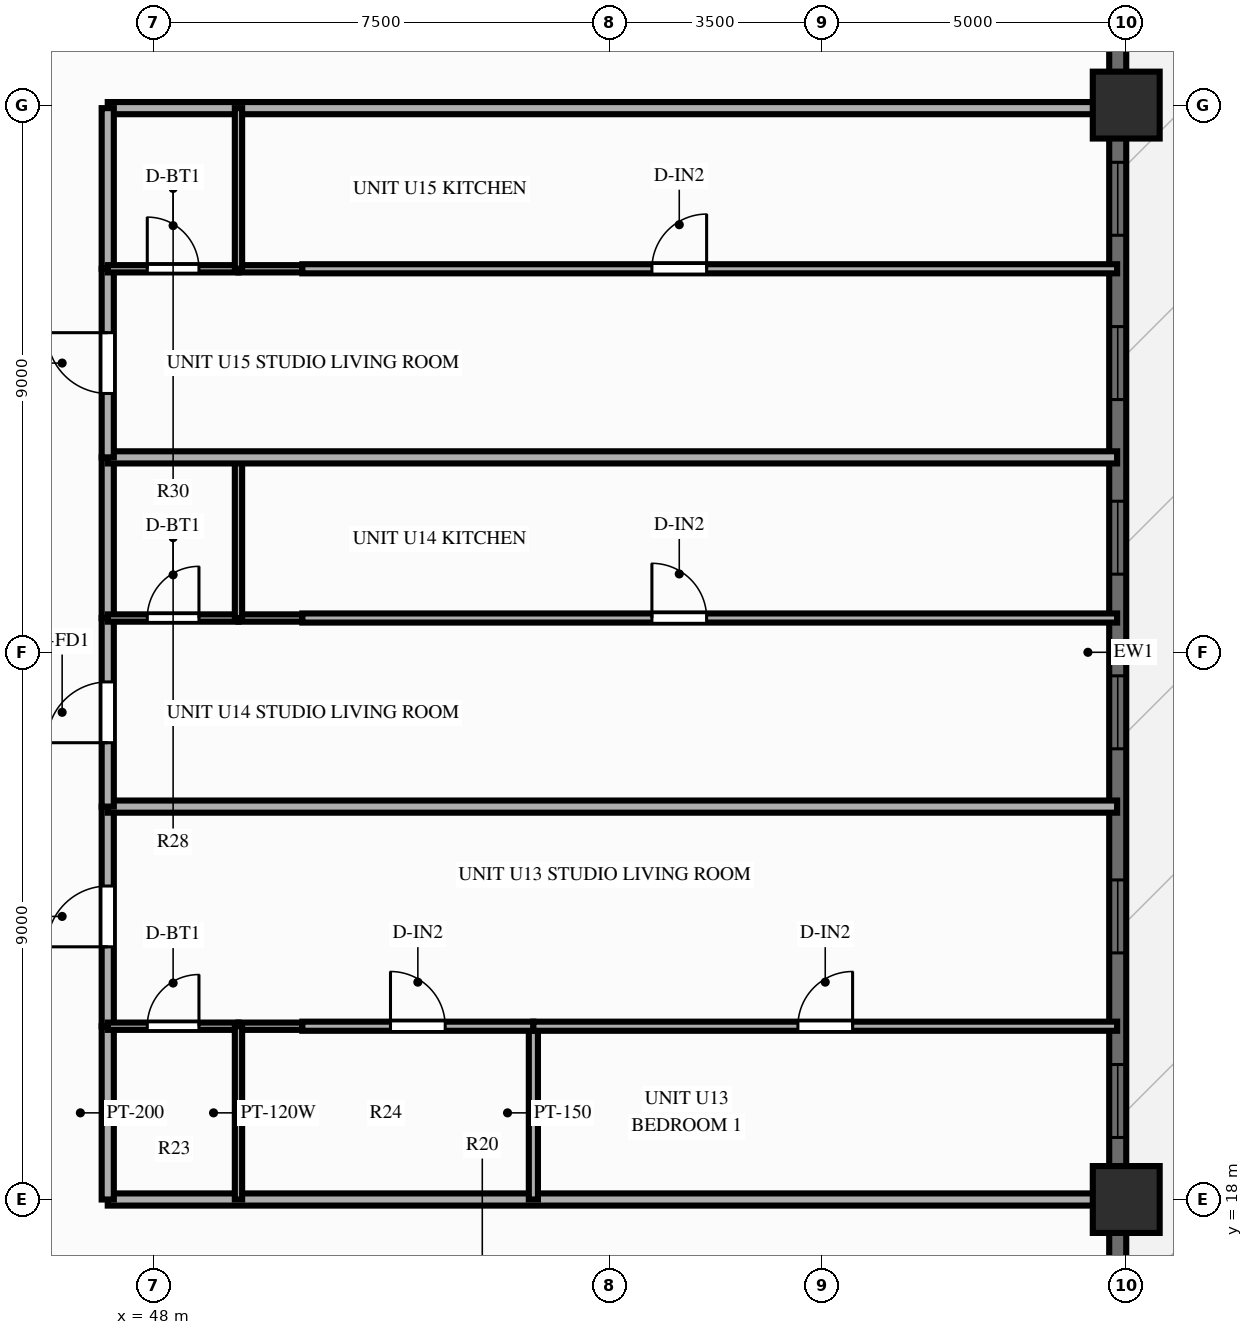
"""IFC4 building model, lengths in metres.
Left out: names, types, materials, properties, quantities, classifications, styles, units other than length and angle.
Written with IfcOpenShell. Run it as: python <this file> out.ifc"""

import sys

from ifc_helpers import new_model, si_unit, direction, frame, frame_2d, origin, origin_2d, place, context, subcontext, project, spatial, rectangle, extrude, source, transform, mapped, element, fill, save


model = new_model("IFC4")
c1 = context("Model", 3, precision=1e-05, world=origin(), true_north=direction((0.0, 1.0)))
c2 = subcontext(c1, "Body", "Model", "MODEL_VIEW")
j1 = project(units=[si_unit("LENGTHUNIT", "METRE"), si_unit("PLANEANGLEUNIT", "RADIAN")], contexts=[c1])
p1 = place(None, origin())
s1 = spatial("IfcSite", under=j1, at=p1, CompositionType="ELEMENT")
p2 = place(p1, origin())
s2 = spatial("IfcBuilding", under=s1, at=p2, CompositionType="ELEMENT")
p3 = place(p2, frame((0.0, 0.0, 61.4)))
s3 = spatial("IfcBuildingStorey", under=s2, at=p3, CompositionType="ELEMENT", Elevation=61.4)
m1 = source(origin(), c2, "Body", "SweptSolid", [
    extrude(rectangle(XDim=1.1, YDim=1.1, at=origin_2d()), origin(), (0.0, 0.0, 1.0), 3.0),
])
for number, where, z_axis, x_axis in (
    (1, (64.0, 18.0, 0.0), (0.0, 0.0, 1.0), (1.0, 0.0, 0.0)),
    (2, (64.0, 36.0, 0.0), (0.0, 0.0, 1.0), (1.0, 0.0, 0.0)),
):
    element("IfcColumn", number, at=place(p3, frame(where, z_axis=z_axis, x_axis=x_axis)), inside=s3, PredefinedType="COLUMN", context=c2, shape_type="MappedRepresentation", body=[
        mapped(m1, transform((0.0, 0.0, 0.0), scale=1.0)),
    ])
p4 = place(p3, frame((63.86, 6.5, 0.0), z_axis=(0.0, 0.0, 1.0), x_axis=(0.0, 1.0, 0.0)))
e3 = element("IfcWall", 3, at=p4, inside=s3, PredefinedType="SOLIDWALL", context=c2, shape_type="SweptSolid", body=[
    extrude(rectangle(XDim=41.0, YDim=0.28, at=frame_2d((20.5, 0.0))), origin(), (0.0, 0.0, 1.0), 2.28),
])
p5 = place(p4, frame((5.15, 0.0, 0.25)))
e4 = element("IfcOpeningElement", 4, at=p5, cuts=e3, PredefinedType="OPENING", context=c2, shape_type="SweptSolid", body=[
    extrude(rectangle(XDim=1.2, YDim=1.5, at=frame_2d((0.6, 0.75))), frame((0.0, 0.152, 0.0), z_axis=(0.0, -1.0, 0.0), x_axis=(1.0, 0.0, 0.0)), (0.0, 0.0, 1.0), 0.304),
])
p6 = place(p4, frame((12.52, 0.0, 0.25)))
e5 = element("IfcOpeningElement", 5, at=p6, cuts=e3, PredefinedType="OPENING", context=c2, shape_type="SweptSolid", body=[
    extrude(rectangle(XDim=1.2, YDim=1.5, at=frame_2d((0.6, 0.75))), frame((0.0, 0.152, 0.0), z_axis=(0.0, -1.0, 0.0), x_axis=(1.0, 0.0, 0.0)), (0.0, 0.0, 1.0), 0.304),
])
p7 = place(p4, frame((15.556, 0.0, 0.25)))
e6 = element("IfcOpeningElement", 6, at=p7, cuts=e3, PredefinedType="OPENING", context=c2, shape_type="SweptSolid", body=[
    extrude(rectangle(XDim=1.2, YDim=1.5, at=frame_2d((0.6, 0.75))), frame((0.0, 0.152, 0.0), z_axis=(0.0, -1.0, 0.0), x_axis=(1.0, 0.0, 0.0)), (0.0, 0.0, 1.0), 0.304),
])
p8 = place(p4, frame((18.913, 0.0, 0.25)))
e7 = element("IfcOpeningElement", 7, at=p8, cuts=e3, PredefinedType="OPENING", context=c2, shape_type="SweptSolid", body=[
    extrude(rectangle(XDim=1.2, YDim=1.5, at=frame_2d((0.6, 0.75))), frame((0.0, 0.152, 0.0), z_axis=(0.0, -1.0, 0.0), x_axis=(1.0, 0.0, 0.0)), (0.0, 0.0, 1.0), 0.304),
])
p9 = place(p4, frame((21.785, 0.0, 0.25)))
e8 = element("IfcOpeningElement", 8, at=p9, cuts=e3, PredefinedType="OPENING", context=c2, shape_type="SweptSolid", body=[
    extrude(rectangle(XDim=1.2, YDim=1.5, at=frame_2d((0.6, 0.75))), frame((0.0, 0.152, 0.0), z_axis=(0.0, -1.0, 0.0), x_axis=(1.0, 0.0, 0.0)), (0.0, 0.0, 1.0), 0.304),
])
p10 = place(p4, frame((24.657, 0.0, 0.25)))
e9 = element("IfcOpeningElement", 9, at=p10, cuts=e3, PredefinedType="OPENING", context=c2, shape_type="SweptSolid", body=[
    extrude(rectangle(XDim=1.2, YDim=1.5, at=frame_2d((0.6, 0.75))), frame((0.0, 0.152, 0.0), z_axis=(0.0, -1.0, 0.0), x_axis=(1.0, 0.0, 0.0)), (0.0, 0.0, 1.0), 0.304),
])
p11 = place(p4, frame((27.359, 0.0, 0.25)))
e10 = element("IfcOpeningElement", 10, at=p11, cuts=e3, PredefinedType="OPENING", context=c2, shape_type="SweptSolid", body=[
    extrude(rectangle(XDim=1.2, YDim=1.5, at=frame_2d((0.6, 0.75))), frame((0.0, 0.152, 0.0), z_axis=(0.0, -1.0, 0.0), x_axis=(1.0, 0.0, 0.0)), (0.0, 0.0, 1.0), 0.304),
])
p12 = place(p4, frame((36.05, 0.0, 0.0), z_axis=(0.0, 0.0, 1.0), x_axis=(-1.0, 0.0, 0.0)))
e11 = element("IfcOpeningElement", 11, at=p12, cuts=e3, PredefinedType="OPENING", context=c2, shape_type="SweptSolid", body=[
    extrude(rectangle(XDim=1.6, YDim=2.15, at=frame_2d((0.8, 1.075))), frame((0.0, 0.152, 0.0), z_axis=(0.0, -1.0, 0.0), x_axis=(1.0, 0.0, 0.0)), (0.0, 0.0, 1.0), 0.304),
])
for number, where, z_axis, x_axis in (
    (12, (47.25, 18.0, 0.0), (0.0, 0.0, 1.0), (1.0, 0.0, 0.0)),
    (13, (47.25, 35.95, 0.0), (0.0, 0.0, 1.0), (1.0, 0.0, 0.0)),
):
    element("IfcWall", number, at=place(p3, frame(where, z_axis=z_axis, x_axis=x_axis)), inside=s3, PredefinedType="PARTITIONING", context=c2, shape_type="SweptSolid", body=[
        extrude(rectangle(XDim=16.6, YDim=0.2, at=frame_2d((8.3, 0.0))), origin(), (0.0, 0.0, 1.0), 2.24),
    ])
p13 = place(p3, frame((47.25, 18.0, 0.0), z_axis=(0.0, 0.0, 1.0), x_axis=(0.0, 1.0, 0.0)))
e14 = element("IfcWall", 14, at=p13, inside=s3, PredefinedType="PARTITIONING", context=c2, shape_type="SweptSolid", body=[
    extrude(rectangle(XDim=2.85, YDim=0.2, at=frame_2d((1.425, 0.0))), origin(), (0.0, 0.0, 1.0), 2.79),
])
p14 = place(p3, frame((47.25, 20.85, 0.0), z_axis=(0.0, 0.0, 1.0), x_axis=(0.0, 1.0, 0.0)))
e15 = element("IfcWall", 15, at=p14, inside=s3, PredefinedType="PARTITIONING", context=c2, shape_type="SweptSolid", body=[
    extrude(rectangle(XDim=3.612, YDim=0.2, at=frame_2d((1.806, 0.0))), origin(), (0.0, 0.0, 1.0), 2.79),
])
p15 = place(p14, frame((1.306, 0.0, 0.0)))
e16 = element("IfcOpeningElement", 16, at=p15, cuts=e15, PredefinedType="OPENING", context=c2, shape_type="SweptSolid", body=[
    extrude(rectangle(XDim=1.0, YDim=2.15, at=frame_2d((0.5, 1.075))), frame((0.0, 0.112, 0.0), z_axis=(0.0, -1.0, 0.0), x_axis=(1.0, 0.0, 0.0)), (0.0, 0.0, 1.0), 0.224),
])
p16 = place(p3, frame((47.25, 20.85, 0.0), z_axis=(0.0, 0.0, 1.0), x_axis=(1.0, 0.0, 0.0)))
e17 = element("IfcWall", 17, at=p16, inside=s3, PredefinedType="PARTITIONING", context=c2, shape_type="SweptSolid", body=[
    extrude(rectangle(XDim=2.15, YDim=0.12, at=frame_2d((1.075, 0.0))), origin(), (0.0, 0.0, 1.0), 2.79),
])
p17 = place(p16, frame((0.65, 0.0, 0.0)))
e18 = element("IfcOpeningElement", 18, at=p17, cuts=e17, PredefinedType="OPENING", context=c2, shape_type="SweptSolid", body=[
    extrude(rectangle(XDim=0.85, YDim=2.05, at=frame_2d((0.425, 1.025))), frame((0.0, 0.072, 0.0), z_axis=(0.0, -1.0, 0.0), x_axis=(1.0, 0.0, 0.0)), (0.0, 0.0, 1.0), 0.144),
])
p18 = place(p3, frame((49.4, 20.85, 0.0), z_axis=(0.0, 0.0, 1.0), x_axis=(1.0, 0.0, 0.0)))
e19 = element("IfcWall", 19, at=p18, inside=s3, PredefinedType="PARTITIONING", context=c2, shape_type="SweptSolid", body=[
    extrude(rectangle(XDim=1.05, YDim=0.12, at=frame_2d((0.525, 0.0))), origin(), (0.0, 0.0, 1.0), 2.79),
])
p19 = place(p3, frame((49.4, 18.0, 0.0), z_axis=(0.0, 0.0, 1.0), x_axis=(0.0, 1.0, 0.0)))
e20 = element("IfcWall", 20, at=p19, inside=s3, PredefinedType="PARTITIONING", context=c2, shape_type="SweptSolid", body=[
    extrude(rectangle(XDim=2.85, YDim=0.12, at=frame_2d((1.425, 0.0))), origin(), (0.0, 0.0, 1.0), 2.79),
])
p20 = place(p3, frame((54.25, 18.0, 0.0), z_axis=(0.0, 0.0, 1.0), x_axis=(0.0, 1.0, 0.0)))
e21 = element("IfcWall", 21, at=p20, inside=s3, PredefinedType="PARTITIONING", context=c2, shape_type="SweptSolid", body=[
    extrude(rectangle(XDim=2.85, YDim=0.15, at=frame_2d((1.425, 0.0))), origin(), (0.0, 0.0, 1.0), 2.44),
])
p21 = place(p3, frame((50.45, 20.85, 0.0), z_axis=(0.0, 0.0, 1.0), x_axis=(1.0, 0.0, 0.0)))
e22 = element("IfcWall", 22, at=p21, inside=s3, PredefinedType="PARTITIONING", context=c2, shape_type="SweptSolid", body=[
    extrude(rectangle(XDim=3.8, YDim=0.15, at=frame_2d((1.9, 0.0))), origin(), (0.0, 0.0, 1.0), 2.79),
])
p22 = place(p21, frame((1.45, 0.0, 0.0)))
e23 = element("IfcOpeningElement", 23, at=p22, cuts=e22, PredefinedType="OPENING", context=c2, shape_type="SweptSolid", body=[
    extrude(rectangle(XDim=0.9, YDim=2.1, at=frame_2d((0.45, 1.05))), frame((0.0, 0.087, 0.0), z_axis=(0.0, -1.0, 0.0), x_axis=(1.0, 0.0, 0.0)), (0.0, 0.0, 1.0), 0.174),
])
p23 = place(p3, frame((54.25, 20.85, 0.0), z_axis=(0.0, 0.0, 1.0), x_axis=(1.0, 0.0, 0.0)))
e24 = element("IfcWall", 24, at=p23, inside=s3, PredefinedType="PARTITIONING", context=c2, shape_type="SweptSolid", body=[
    extrude(rectangle(XDim=9.6, YDim=0.15, at=frame_2d((4.8, 0.0))), origin(), (0.0, 0.0, 1.0), 2.79),
])
p24 = place(p23, frame((4.35, 0.0, 0.0)))
e25 = element("IfcOpeningElement", 25, at=p24, cuts=e24, PredefinedType="OPENING", context=c2, shape_type="SweptSolid", body=[
    extrude(rectangle(XDim=0.9, YDim=2.1, at=frame_2d((0.45, 1.05))), frame((0.0, 0.087, 0.0), z_axis=(0.0, -1.0, 0.0), x_axis=(1.0, 0.0, 0.0)), (0.0, 0.0, 1.0), 0.174),
])
p25 = place(p3, frame((47.25, 24.462, 0.0), z_axis=(0.0, 0.0, 1.0), x_axis=(1.0, 0.0, 0.0)))
e26 = element("IfcWall", 26, at=p25, inside=s3, PredefinedType="PARTITIONING", context=c2, shape_type="SweptSolid", body=[
    extrude(rectangle(XDim=16.6, YDim=0.2, at=frame_2d((8.3, 0.0))), origin(), (0.0, 0.0, 1.0), 2.79),
])
p26 = place(p3, frame((47.25, 24.462, 0.0), z_axis=(0.0, 0.0, 1.0), x_axis=(0.0, 1.0, 0.0)))
e27 = element("IfcWall", 27, at=p26, inside=s3, PredefinedType="PARTITIONING", context=c2, shape_type="SweptSolid", body=[
    extrude(rectangle(XDim=3.102, YDim=0.2, at=frame_2d((1.551, 0.0))), origin(), (0.0, 0.0, 1.0), 2.79),
])
p27 = place(p26, frame((1.051, 0.0, 0.0)))
e28 = element("IfcOpeningElement", 28, at=p27, cuts=e27, PredefinedType="OPENING", context=c2, shape_type="SweptSolid", body=[
    extrude(rectangle(XDim=1.0, YDim=2.15, at=frame_2d((0.5, 1.075))), frame((0.0, 0.112, 0.0), z_axis=(0.0, -1.0, 0.0), x_axis=(1.0, 0.0, 0.0)), (0.0, 0.0, 1.0), 0.224),
])
p28 = place(p3, frame((47.25, 27.564, 0.0), z_axis=(0.0, 0.0, 1.0), x_axis=(0.0, 1.0, 0.0)))
e29 = element("IfcWall", 29, at=p28, inside=s3, PredefinedType="PARTITIONING", context=c2, shape_type="SweptSolid", body=[
    extrude(rectangle(XDim=2.642, YDim=0.2, at=frame_2d((1.321, 0.0))), origin(), (0.0, 0.0, 1.0), 2.79),
])
p29 = place(p3, frame((47.25, 27.564, 0.0), z_axis=(0.0, 0.0, 1.0), x_axis=(1.0, 0.0, 0.0)))
e30 = element("IfcWall", 30, at=p29, inside=s3, PredefinedType="PARTITIONING", context=c2, shape_type="SweptSolid", body=[
    extrude(rectangle(XDim=2.15, YDim=0.12, at=frame_2d((1.075, 0.0))), origin(), (0.0, 0.0, 1.0), 2.79),
])
p30 = place(p29, frame((0.65, 0.0, 0.0)))
e31 = element("IfcOpeningElement", 31, at=p30, cuts=e30, PredefinedType="OPENING", context=c2, shape_type="SweptSolid", body=[
    extrude(rectangle(XDim=0.85, YDim=2.05, at=frame_2d((0.425, 1.025))), frame((0.0, 0.072, 0.0), z_axis=(0.0, -1.0, 0.0), x_axis=(1.0, 0.0, 0.0)), (0.0, 0.0, 1.0), 0.144),
])
p31 = place(p3, frame((49.4, 27.564, 0.0), z_axis=(0.0, 0.0, 1.0), x_axis=(1.0, 0.0, 0.0)))
e32 = element("IfcWall", 32, at=p31, inside=s3, PredefinedType="PARTITIONING", context=c2, shape_type="SweptSolid", body=[
    extrude(rectangle(XDim=1.05, YDim=0.12, at=frame_2d((0.525, 0.0))), origin(), (0.0, 0.0, 1.0), 2.79),
])
p32 = place(p3, frame((49.4, 27.564, 0.0), z_axis=(0.0, 0.0, 1.0), x_axis=(0.0, 1.0, 0.0)))
e33 = element("IfcWall", 33, at=p32, inside=s3, PredefinedType="PARTITIONING", context=c2, shape_type="SweptSolid", body=[
    extrude(rectangle(XDim=2.642, YDim=0.12, at=frame_2d((1.321, 0.0))), origin(), (0.0, 0.0, 1.0), 2.79),
])
p33 = place(p3, frame((50.45, 27.564, 0.0), z_axis=(0.0, 0.0, 1.0), x_axis=(1.0, 0.0, 0.0)))
e34 = element("IfcWall", 34, at=p33, inside=s3, PredefinedType="PARTITIONING", context=c2, shape_type="SweptSolid", body=[
    extrude(rectangle(XDim=13.4, YDim=0.15, at=frame_2d((6.7, 0.0))), origin(), (0.0, 0.0, 1.0), 2.79),
])
p34 = place(p33, frame((5.749, 0.0, 0.0)))
e35 = element("IfcOpeningElement", 35, at=p34, cuts=e34, PredefinedType="OPENING", context=c2, shape_type="SweptSolid", body=[
    extrude(rectangle(XDim=0.9, YDim=2.1, at=frame_2d((0.45, 1.05))), frame((0.0, 0.087, 0.0), z_axis=(0.0, -1.0, 0.0), x_axis=(1.0, 0.0, 0.0)), (0.0, 0.0, 1.0), 0.174),
])
p35 = place(p3, frame((47.25, 30.206, 0.0), z_axis=(0.0, 0.0, 1.0), x_axis=(1.0, 0.0, 0.0)))
e36 = element("IfcWall", 36, at=p35, inside=s3, PredefinedType="PARTITIONING", context=c2, shape_type="SweptSolid", body=[
    extrude(rectangle(XDim=16.6, YDim=0.2, at=frame_2d((8.3, 0.0))), origin(), (0.0, 0.0, 1.0), 2.79),
])
p36 = place(p3, frame((47.25, 30.206, 0.0), z_axis=(0.0, 0.0, 1.0), x_axis=(0.0, 1.0, 0.0)))
e37 = element("IfcWall", 37, at=p36, inside=s3, PredefinedType="PARTITIONING", context=c2, shape_type="SweptSolid", body=[
    extrude(rectangle(XDim=3.102, YDim=0.2, at=frame_2d((1.551, 0.0))), origin(), (0.0, 0.0, 1.0), 2.79),
])
p37 = place(p36, frame((1.051, 0.0, 0.0)))
e38 = element("IfcOpeningElement", 38, at=p37, cuts=e37, PredefinedType="OPENING", context=c2, shape_type="SweptSolid", body=[
    extrude(rectangle(XDim=1.0, YDim=2.15, at=frame_2d((0.5, 1.075))), frame((0.0, 0.112, 0.0), z_axis=(0.0, -1.0, 0.0), x_axis=(1.0, 0.0, 0.0)), (0.0, 0.0, 1.0), 0.224),
])
p38 = place(p3, frame((47.25, 33.308, 0.0), z_axis=(0.0, 0.0, 1.0), x_axis=(0.0, 1.0, 0.0)))
e39 = element("IfcWall", 39, at=p38, inside=s3, PredefinedType="PARTITIONING", context=c2, shape_type="SweptSolid", body=[
    extrude(rectangle(XDim=2.642, YDim=0.2, at=frame_2d((1.321, 0.0))), origin(), (0.0, 0.0, 1.0), 2.79),
])
p39 = place(p3, frame((47.25, 33.308, 0.0), z_axis=(0.0, 0.0, 1.0), x_axis=(1.0, 0.0, 0.0)))
e40 = element("IfcWall", 40, at=p39, inside=s3, PredefinedType="PARTITIONING", context=c2, shape_type="SweptSolid", body=[
    extrude(rectangle(XDim=2.15, YDim=0.12, at=frame_2d((1.075, 0.0))), origin(), (0.0, 0.0, 1.0), 2.79),
])
p40 = place(p39, frame((0.65, 0.0, 0.0)))
e41 = element("IfcOpeningElement", 41, at=p40, cuts=e40, PredefinedType="OPENING", context=c2, shape_type="SweptSolid", body=[
    extrude(rectangle(XDim=0.85, YDim=2.05, at=frame_2d((0.425, 1.025))), frame((0.0, 0.072, 0.0), z_axis=(0.0, -1.0, 0.0), x_axis=(1.0, 0.0, 0.0)), (0.0, 0.0, 1.0), 0.144),
])
p41 = place(p3, frame((49.4, 33.308, 0.0), z_axis=(0.0, 0.0, 1.0), x_axis=(1.0, 0.0, 0.0)))
e42 = element("IfcWall", 42, at=p41, inside=s3, PredefinedType="PARTITIONING", context=c2, shape_type="SweptSolid", body=[
    extrude(rectangle(XDim=1.05, YDim=0.12, at=frame_2d((0.525, 0.0))), origin(), (0.0, 0.0, 1.0), 2.79),
])
p42 = place(p3, frame((49.4, 33.308, 0.0), z_axis=(0.0, 0.0, 1.0), x_axis=(0.0, 1.0, 0.0)))
e43 = element("IfcWall", 43, at=p42, inside=s3, PredefinedType="PARTITIONING", context=c2, shape_type="SweptSolid", body=[
    extrude(rectangle(XDim=2.642, YDim=0.12, at=frame_2d((1.321, 0.0))), origin(), (0.0, 0.0, 1.0), 2.79),
])
p43 = place(p3, frame((50.45, 33.308, 0.0), z_axis=(0.0, 0.0, 1.0), x_axis=(1.0, 0.0, 0.0)))
e44 = element("IfcWall", 44, at=p43, inside=s3, PredefinedType="PARTITIONING", context=c2, shape_type="SweptSolid", body=[
    extrude(rectangle(XDim=13.4, YDim=0.15, at=frame_2d((6.7, 0.0))), origin(), (0.0, 0.0, 1.0), 2.79),
])
p44 = place(p43, frame((5.749, 0.0, 0.0)))
e45 = element("IfcOpeningElement", 45, at=p44, cuts=e44, PredefinedType="OPENING", context=c2, shape_type="SweptSolid", body=[
    extrude(rectangle(XDim=0.9, YDim=2.1, at=frame_2d((0.45, 1.05))), frame((0.0, 0.087, 0.0), z_axis=(0.0, -1.0, 0.0), x_axis=(1.0, 0.0, 0.0)), (0.0, 0.0, 1.0), 0.174),
])
m2 = source(origin(), c2, "Body", "SweptSolid", [
    extrude(rectangle(XDim=1.2, YDim=1.5, at=frame_2d((0.6, 0.75))), frame((0.0, 0.03, 0.0), z_axis=(0.0, -1.0, 0.0), x_axis=(1.0, 0.0, 0.0)), (0.0, 0.0, 1.0), 0.06),
])
p45 = place(p6, origin())
e46 = element("IfcWindow", 46, at=p45, inside=s3, PartitioningType="SINGLE_PANEL", PredefinedType="WINDOW", context=c2, shape_type="MappedRepresentation", body=[
    mapped(m2, transform((0.0, 0.0, 0.0), scale=1.0)),
])
fill(e5, e46)
p46 = place(p7, origin())
e47 = element("IfcWindow", 47, at=p46, inside=s3, PartitioningType="SINGLE_PANEL", PredefinedType="WINDOW", context=c2, shape_type="MappedRepresentation", body=[
    mapped(m2, transform((0.0, 0.0, 0.0), scale=1.0)),
])
fill(e6, e47)
p47 = place(p8, origin())
e48 = element("IfcWindow", 48, at=p47, inside=s3, PartitioningType="SINGLE_PANEL", PredefinedType="WINDOW", context=c2, shape_type="MappedRepresentation", body=[
    mapped(m2, transform((0.0, 0.0, 0.0), scale=1.0)),
])
fill(e7, e48)
p48 = place(p9, origin())
e49 = element("IfcWindow", 49, at=p48, inside=s3, PartitioningType="SINGLE_PANEL", PredefinedType="WINDOW", context=c2, shape_type="MappedRepresentation", body=[
    mapped(m2, transform((0.0, 0.0, 0.0), scale=1.0)),
])
fill(e8, e49)
p49 = place(p10, origin())
e50 = element("IfcWindow", 50, at=p49, inside=s3, PartitioningType="SINGLE_PANEL", PredefinedType="WINDOW", context=c2, shape_type="MappedRepresentation", body=[
    mapped(m2, transform((0.0, 0.0, 0.0), scale=1.0)),
])
fill(e9, e50)
p50 = place(p11, origin())
e51 = element("IfcWindow", 51, at=p50, inside=s3, PartitioningType="SINGLE_PANEL", PredefinedType="WINDOW", context=c2, shape_type="MappedRepresentation", body=[
    mapped(m2, transform((0.0, 0.0, 0.0), scale=1.0)),
])
fill(e10, e51)
m3 = source(origin(), c2, "Body", "SweptSolid", [
    extrude(rectangle(XDim=1.0, YDim=2.15, at=frame_2d((0.5, 1.075))), frame((0.0, 0.025, 0.0), z_axis=(0.0, -1.0, 0.0), x_axis=(1.0, 0.0, 0.0)), (0.0, 0.0, 1.0), 0.05),
])
p51 = place(p15, origin())
e52 = element("IfcDoor", 52, at=p51, inside=s3, OperationType="SINGLE_SWING_LEFT", PredefinedType="DOOR", context=c2, shape_type="MappedRepresentation", body=[
    mapped(m3, transform((0.0, 0.0, 0.0), scale=1.0)),
])
fill(e16, e52)
m4 = source(origin(), c2, "Body", "SweptSolid", [
    extrude(rectangle(XDim=0.85, YDim=2.05, at=frame_2d((0.425, 1.025))), frame((0.0, 0.025, 0.0), z_axis=(0.0, -1.0, 0.0), x_axis=(1.0, 0.0, 0.0)), (0.0, 0.0, 1.0), 0.05),
])
p52 = place(p17, origin())
e53 = element("IfcDoor", 53, at=p52, inside=s3, OperationType="SINGLE_SWING_RIGHT", PredefinedType="DOOR", context=c2, shape_type="MappedRepresentation", body=[
    mapped(m4, transform((0.0, 0.0, 0.0), scale=1.0)),
])
fill(e18, e53)
m5 = source(origin(), c2, "Body", "SweptSolid", [
    extrude(rectangle(XDim=0.9, YDim=2.1, at=frame_2d((0.45, 1.05))), frame((0.0, 0.025, 0.0), z_axis=(0.0, -1.0, 0.0), x_axis=(1.0, 0.0, 0.0)), (0.0, 0.0, 1.0), 0.05),
])
p53 = place(p22, origin())
e54 = element("IfcDoor", 54, at=p53, inside=s3, OperationType="SINGLE_SWING_LEFT", PredefinedType="DOOR", context=c2, shape_type="MappedRepresentation", body=[
    mapped(m5, transform((0.0, 0.0, 0.0), scale=1.0)),
])
fill(e23, e54)
p54 = place(p24, origin())
e55 = element("IfcDoor", 55, at=p54, inside=s3, OperationType="SINGLE_SWING_RIGHT", PredefinedType="DOOR", context=c2, shape_type="MappedRepresentation", body=[
    mapped(m5, transform((0.0, 0.0, 0.0), scale=1.0)),
])
fill(e25, e55)
p55 = place(p27, origin())
e56 = element("IfcDoor", 56, at=p55, inside=s3, OperationType="SINGLE_SWING_LEFT", PredefinedType="DOOR", context=c2, shape_type="MappedRepresentation", body=[
    mapped(m3, transform((0.0, 0.0, 0.0), scale=1.0)),
])
fill(e28, e56)
p56 = place(p30, origin())
e57 = element("IfcDoor", 57, at=p56, inside=s3, OperationType="SINGLE_SWING_RIGHT", PredefinedType="DOOR", context=c2, shape_type="MappedRepresentation", body=[
    mapped(m4, transform((0.0, 0.0, 0.0), scale=1.0)),
])
fill(e31, e57)
p57 = place(p34, origin())
e58 = element("IfcDoor", 58, at=p57, inside=s3, OperationType="SINGLE_SWING_LEFT", PredefinedType="DOOR", context=c2, shape_type="MappedRepresentation", body=[
    mapped(m5, transform((0.0, 0.0, 0.0), scale=1.0)),
])
fill(e35, e58)
p58 = place(p37, origin())
e59 = element("IfcDoor", 59, at=p58, inside=s3, OperationType="SINGLE_SWING_RIGHT", PredefinedType="DOOR", context=c2, shape_type="MappedRepresentation", body=[
    mapped(m3, transform((0.0, 0.0, 0.0), scale=1.0)),
])
fill(e38, e59)
p59 = place(p40, origin())
e60 = element("IfcDoor", 60, at=p59, inside=s3, OperationType="SINGLE_SWING_LEFT", PredefinedType="DOOR", context=c2, shape_type="MappedRepresentation", body=[
    mapped(m4, transform((0.0, 0.0, 0.0), scale=1.0)),
])
fill(e41, e60)
p60 = place(p44, origin())
e61 = element("IfcDoor", 61, at=p60, inside=s3, OperationType="SINGLE_SWING_RIGHT", PredefinedType="DOOR", context=c2, shape_type="MappedRepresentation", body=[
    mapped(m5, transform((0.0, 0.0, 0.0), scale=1.0)),
])
fill(e45, e61)
save(model, sys.argv[1])
